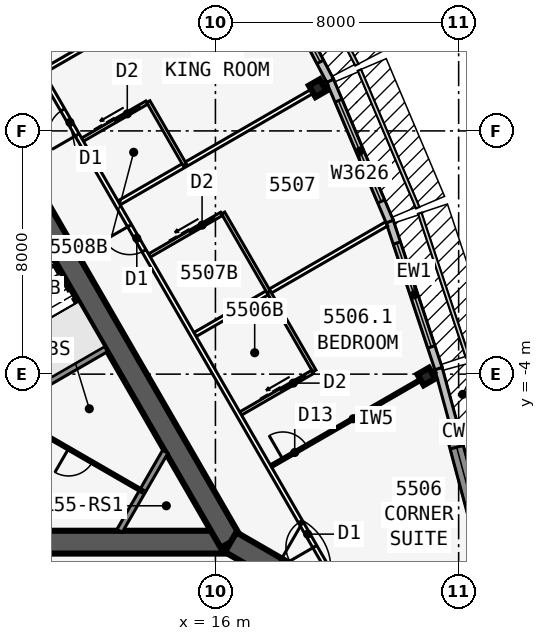
"""IFC4 building model, lengths in metres.
Left out: names, types, materials, properties, quantities, classifications, styles, units other than length and angle.
Written with IfcOpenShell. Run it as: python <this file> out.ifc"""

import sys

from ifc_helpers import new_model, si_unit, direction, frame, frame_2d, origin, origin_2d, place, context, subcontext, project, spatial, polyline, rectangle, i_section, outline, extrude, element, fill, save


model = new_model("IFC4")
c1 = context("Model", 3, precision=1e-05, world=origin(), true_north=direction((0.0, 1.0)))
c2 = subcontext(c1, "Body", "Model", "MODEL_VIEW")
j1 = project(units=[si_unit("LENGTHUNIT", "METRE"), si_unit("PLANEANGLEUNIT", "RADIAN")], contexts=[c1])
p1 = place(None, origin())
s1 = spatial("IfcSite", under=j1, at=p1, CompositionType="ELEMENT")
p2 = place(p1, origin())
s2 = spatial("IfcBuilding", under=s1, at=p2, CompositionType="ELEMENT")
p3 = place(p2, frame((0.0, 0.0, 208.1)))
s3 = spatial("IfcBuildingStorey", under=s2, at=p3, CompositionType="ELEMENT", Elevation=208.1)
p4 = place(p3, frame((-16.5, -9.526, 0.0), z_axis=(0.0, 0.0, 1.0), x_axis=(1.0, 0.0, 0.0)))
e1 = element("IfcWall", 1, at=p4, inside=s3, PredefinedType="SHEAR", context=c2, shape_type="SweptSolid", body=[
    extrude(rectangle(XDim=33.0, YDim=0.75, at=frame_2d((16.5, 0.0))), origin(), (0.0, 0.0, 1.0), 3.6),
])
p5 = place(p4, frame((14.05, 0.0, 0.0)))
e2 = element("IfcOpeningElement", 2, at=p5, cuts=e1, PredefinedType="OPENING", context=c2, shape_type="SweptSolid", body=[
    extrude(rectangle(XDim=1.8, YDim=2.13, at=frame_2d((0.9, 1.065))), frame((0.0, 0.385, 0.0), z_axis=(0.0, -1.0, 0.0), x_axis=(1.0, 0.0, 0.0)), (0.0, 0.0, 1.0), 0.77),
])
p6 = place(p3, frame((16.5, -9.526, 0.0), z_axis=(0.0, 0.0, 1.0), x_axis=(-0.499999749417, 0.866025548458, 0.0)))
e3 = element("IfcWall", 3, at=p6, inside=s3, PredefinedType="SHEAR", context=c2, shape_type="SweptSolid", body=[
    extrude(rectangle(XDim=33.0, YDim=0.75, at=frame_2d((16.5, 0.0))), origin(), (0.0, 0.0, 1.0), 3.6),
])
p7 = place(p6, frame((14.15, 0.0, 0.0)))
e4 = element("IfcOpeningElement", 4, at=p7, cuts=e3, PredefinedType="OPENING", context=c2, shape_type="SweptSolid", body=[
    extrude(rectangle(XDim=1.8, YDim=2.13, at=frame_2d((0.9, 1.065))), frame((0.0, 0.385, 0.0), z_axis=(0.0, -1.0, 0.0), x_axis=(1.0, 0.0, 0.0)), (0.0, 0.0, 1.0), 0.77),
])
p8 = place(p6, frame((12.6, 0.0, 0.0)))
e5 = element("IfcOpeningElement", 5, at=p8, cuts=e3, PredefinedType="OPENING", context=c2, shape_type="SweptSolid", body=[
    extrude(rectangle(XDim=1.0, YDim=2.13, at=frame_2d((0.5, 1.065))), frame((0.0, 0.385, 0.0), z_axis=(0.0, -1.0, 0.0), x_axis=(1.0, 0.0, 0.0)), (0.0, 0.0, 1.0), 0.77),
])
p9 = place(p3, frame((9.629, -4.775, 0.0), z_axis=(0.0, 0.0, 1.0), x_axis=(0.866008981251, 0.500028443584, 0.0)))
e6 = element("IfcWall", 6, at=p9, inside=s3, PredefinedType="SOLIDWALL", context=c2, shape_type="SweptSolid", body=[
    extrude(rectangle(XDim=3.2, YDim=0.2, at=frame_2d((1.6, 0.0))), origin(), (0.0, 0.0, 1.0), 3.435),
])
p10 = place(p3, frame((16.5, -9.526, 0.0), z_axis=(0.0, 0.0, 1.0), x_axis=(0.866031398331, -0.499989616998, 0.0)))
e7 = element("IfcWall", 7, at=p10, inside=s3, PredefinedType="SHEAR", context=c2, shape_type="SweptSolid", body=[
    extrude(rectangle(XDim=4.746, YDim=0.75, at=frame_2d((2.373, 0.0))), origin(), (0.0, 0.0, 1.0), 3.6),
])
p11 = place(p10, frame((1.725, 0.0, 0.0)))
e8 = element("IfcOpeningElement", 8, at=p11, cuts=e7, PredefinedType="OPENING", context=c2, shape_type="SweptSolid", body=[
    extrude(rectangle(XDim=1.8, YDim=2.13, at=frame_2d((0.9, 1.065))), frame((0.0, 0.385, 0.0), z_axis=(0.0, -1.0, 0.0), x_axis=(1.0, 0.0, 0.0)), (0.0, 0.0, 1.0), 0.77),
])
for number, where, z_axis, x_axis in (
    (9, (22.937, -4.078, 0.0), (0.0, 0.0, 1.0), (-0.5, 0.866, 0.0)),
    (10, (19.363, 5.406, 0.0), (0.0, 0.0, 1.0), (0.866, 0.5, 0.0)),
):
    element("IfcColumn", number, at=place(p3, frame(where, z_axis=z_axis, x_axis=x_axis)), inside=s3, PredefinedType="COLUMN", context=c2, shape_type="SweptSolid", body=[
        extrude(i_section(OverallWidth=0.411, OverallDepth=0.434, WebThickness=0.036, FlangeThickness=0.057, at=origin_2d()), origin(), (0.0, 0.0, 1.0), 3.6),
    ])
p12 = place(p3, frame((23.783, -13.798, 0.0), z_axis=(0.0, 0.0, 1.0), x_axis=(0.258799282522, 0.96593112144, 0.0)))
e11 = element("IfcWall", 11, at=p12, inside=s3, PredefinedType="SOLIDWALL", context=c2, shape_type="SweptSolid", body=[
    extrude(outline(polyline([(4.184, 0.225), (0.509, 0.225), (0.479, 0.113), (0.059, 0.225), (0.0, 0.225), (0.0, -0.225), (4.184, -0.225), (4.184, 0.225)])), origin(), (0.0, 0.0, 1.0), 3.435),
])
p13 = place(p12, frame((1.071, 0.0, 0.45)))
e12 = element("IfcOpeningElement", 12, at=p13, cuts=e11, PredefinedType="OPENING", context=c2, shape_type="SweptSolid", body=[
    extrude(rectangle(XDim=2.4, YDim=2.6, at=frame_2d((1.2, 1.3))), frame((0.0, 0.235, 0.0), z_axis=(0.0, -1.0, 0.0), x_axis=(1.0, 0.0, 0.0)), (0.0, 0.0, 1.0), 0.47),
])
p14 = place(p3, frame((24.865, -9.873, 0.0), z_axis=(0.0, 0.0, 1.0), x_axis=(-0.258784695888, 0.965935029479, 0.0)))
e13 = element("IfcWall", 13, at=p14, inside=s3, PredefinedType="SOLIDWALL", context=c2, shape_type="SweptSolid", body=[
    extrude(rectangle(XDim=4.184, YDim=0.45, at=frame_2d((2.092, 0.0))), origin(), (0.0, 0.0, 1.0), 3.435),
])
p15 = place(p14, frame((0.592, 0.0, 0.45)))
e14 = element("IfcOpeningElement", 14, at=p15, cuts=e13, PredefinedType="OPENING", context=c2, shape_type="SweptSolid", body=[
    extrude(rectangle(XDim=3.0, YDim=2.6, at=frame_2d((1.5, 1.3))), frame((0.0, 0.235, 0.0), z_axis=(0.0, -1.0, 0.0), x_axis=(1.0, 0.0, 0.0)), (0.0, 0.0, 1.0), 0.47),
])
p16 = place(p3, frame((23.879, -5.806, 0.0), z_axis=(0.0, 0.0, 1.0), x_axis=(-0.262867703986, 0.964831887015, 0.0)))
e15 = element("IfcWall", 15, at=p16, inside=s3, PredefinedType="STANDARD", context=c2, shape_type="SweptSolid", body=[
    extrude(rectangle(XDim=2.068, YDim=0.25, at=frame_2d((1.034, 0.0))), origin(), (0.0, 0.0, 1.0), 3.435),
])
p17 = place(p3, frame((23.338, -3.817, 0.0), z_axis=(0.0, 0.0, 1.0), x_axis=(-0.315108478109, 0.949055660656, 0.0)))
e16 = element("IfcWall", 16, at=p17, inside=s3, PredefinedType="STANDARD", context=c2, shape_type="SweptSolid", body=[
    extrude(rectangle(XDim=5.105, YDim=0.25, at=frame_2d((2.552, 0.0))), origin(), (0.0, 0.0, 1.0), 3.435),
])
p18 = place(p17, frame((0.752, 0.0, 0.45)))
e17 = element("IfcOpeningElement", 17, at=p18, cuts=e16, PredefinedType="OPENING", context=c2, shape_type="SweptSolid", body=[
    extrude(rectangle(XDim=3.6, YDim=2.6, at=frame_2d((1.8, 1.3))), frame((0.0, 0.135, 0.0), z_axis=(0.0, -1.0, 0.0), x_axis=(1.0, 0.0, 0.0)), (0.0, 0.0, 1.0), 0.27),
])
p19 = place(p3, frame((21.733, 1.018, 0.0), z_axis=(0.0, 0.0, 1.0), x_axis=(-0.390096809471, 0.920773848044, 0.0)))
e18 = element("IfcWall", 18, at=p19, inside=s3, PredefinedType="STANDARD", context=c2, shape_type="SweptSolid", body=[
    extrude(rectangle(XDim=5.038, YDim=0.25, at=frame_2d((2.519, 0.0))), origin(), (0.0, 0.0, 1.0), 3.435),
])
p20 = place(p19, frame((0.719, 0.0, 0.45)))
e19 = element("IfcOpeningElement", 19, at=p20, cuts=e18, PredefinedType="OPENING", context=c2, shape_type="SweptSolid", body=[
    extrude(rectangle(XDim=3.6, YDim=2.6, at=frame_2d((1.8, 1.3))), frame((0.0, 0.135, 0.0), z_axis=(0.0, -1.0, 0.0), x_axis=(1.0, 0.0, 0.0)), (0.0, 0.0, 1.0), 0.27),
])
p21 = place(p3, frame((19.772, 5.648, 0.0), z_axis=(0.0, 0.0, 1.0), x_axis=(-0.463976002579, 0.885847768542, 0.0)))
e20 = element("IfcWall", 20, at=p21, inside=s3, PredefinedType="STANDARD", context=c2, shape_type="SweptSolid", body=[
    extrude(rectangle(XDim=5.004, YDim=0.25, at=frame_2d((2.502, 0.0))), origin(), (0.0, 0.0, 1.0), 3.435),
])
p22 = place(p21, frame((0.702, 0.0, 0.45)))
e21 = element("IfcOpeningElement", 21, at=p22, cuts=e20, PredefinedType="OPENING", context=c2, shape_type="SweptSolid", body=[
    extrude(rectangle(XDim=3.6, YDim=2.6, at=frame_2d((1.8, 1.3))), frame((0.0, 0.135, 0.0), z_axis=(0.0, -1.0, 0.0), x_axis=(1.0, 0.0, 0.0)), (0.0, 0.0, 1.0), 0.27),
])
p23 = place(p3, frame((20.102, -11.115, 0.0), z_axis=(0.0, 0.0, 1.0), x_axis=(-0.500000265775, 0.866025250339, 0.0)))
e22 = element("IfcWall", 22, at=p23, inside=s3, PredefinedType="PARTITIONING", context=c2, shape_type="SweptSolid", body=[
    extrude(rectangle(XDim=39.354, YDim=0.15, at=frame_2d((19.677, 0.0))), origin(), (0.0, 0.0, 1.0), 3.435),
])
p24 = place(p23, frame((1.665, 0.0, 0.0)))
e23 = element("IfcOpeningElement", 23, at=p24, cuts=e22, PredefinedType="OPENING", context=c2, shape_type="SweptSolid", body=[
    extrude(rectangle(XDim=0.95, YDim=2.13, at=frame_2d((0.475, 1.065))), frame((0.0, 0.085, 0.0), z_axis=(0.0, -1.0, 0.0), x_axis=(1.0, 0.0, 0.0)), (0.0, 0.0, 1.0), 0.17),
])
p25 = place(p23, frame((12.902, 0.0, 0.0)))
e24 = element("IfcOpeningElement", 24, at=p25, cuts=e22, PredefinedType="OPENING", context=c2, shape_type="SweptSolid", body=[
    extrude(rectangle(XDim=0.95, YDim=2.13, at=frame_2d((0.475, 1.065))), frame((0.0, 0.085, 0.0), z_axis=(0.0, -1.0, 0.0), x_axis=(1.0, 0.0, 0.0)), (0.0, 0.0, 1.0), 0.17),
])
p26 = place(p23, frame((17.302, 0.0, 0.0)))
e25 = element("IfcOpeningElement", 25, at=p26, cuts=e22, PredefinedType="OPENING", context=c2, shape_type="SweptSolid", body=[
    extrude(rectangle(XDim=0.95, YDim=2.13, at=frame_2d((0.475, 1.065))), frame((0.0, 0.085, 0.0), z_axis=(0.0, -1.0, 0.0), x_axis=(1.0, 0.0, 0.0)), (0.0, 0.0, 1.0), 0.17),
])
p27 = place(p23, frame((22.902, 0.0, 0.0)))
e26 = element("IfcOpeningElement", 26, at=p27, cuts=e22, PredefinedType="OPENING", context=c2, shape_type="SweptSolid", body=[
    extrude(rectangle(XDim=0.95, YDim=2.13, at=frame_2d((0.475, 1.065))), frame((0.0, 0.085, 0.0), z_axis=(0.0, -1.0, 0.0), x_axis=(1.0, 0.0, 0.0)), (0.0, 0.0, 1.0), 0.17),
])
p28 = place(p23, frame((32.302, 0.0, 0.0)))
e27 = element("IfcOpeningElement", 27, at=p28, cuts=e22, PredefinedType="OPENING", context=c2, shape_type="SweptSolid", body=[
    extrude(rectangle(XDim=0.95, YDim=2.13, at=frame_2d((0.475, 1.065))), frame((0.0, 0.085, 0.0), z_axis=(0.0, -1.0, 0.0), x_axis=(1.0, 0.0, 0.0)), (0.0, 0.0, 1.0), 0.17),
])
p29 = place(p23, frame((37.302, 0.0, 0.0)))
e28 = element("IfcOpeningElement", 28, at=p29, cuts=e22, PredefinedType="OPENING", context=c2, shape_type="SweptSolid", body=[
    extrude(rectangle(XDim=0.95, YDim=2.13, at=frame_2d((0.475, 1.065))), frame((0.0, 0.085, 0.0), z_axis=(0.0, -1.0, 0.0), x_axis=(1.0, 0.0, 0.0)), (0.0, 0.0, 1.0), 0.17),
])
p30 = place(p3, frame((17.829, -7.027, 0.0), z_axis=(0.0, 0.0, 1.0), x_axis=(0.866026604282, 0.499997920671, 0.0)))
e29 = element("IfcWall", 29, at=p30, inside=s3, PredefinedType="PARTITIONING", context=c2, shape_type="SweptSolid", body=[
    extrude(rectangle(XDim=6.24, YDim=0.1, at=frame_2d((3.12, 0.0))), origin(), (0.0, 0.0, 1.0), 2.589),
])
p31 = place(p30, frame((0.45, 0.0, 0.0)))
e30 = element("IfcOpeningElement", 30, at=p31, cuts=e29, PredefinedType="OPENING", context=c2, shape_type="SweptSolid", body=[
    extrude(rectangle(XDim=0.9, YDim=2.13, at=frame_2d((0.45, 1.065))), frame((0.0, 0.06, 0.0), z_axis=(0.0, -1.0, 0.0), x_axis=(1.0, 0.0, 0.0)), (0.0, 0.0, 1.0), 0.12),
])
p32 = place(p3, frame((15.329, -2.697, 0.0), z_axis=(0.0, 0.0, 1.0), x_axis=(0.866032413668, 0.499987858329, 0.0)))
e31 = element("IfcWall", 31, at=p32, inside=s3, PredefinedType="PARTITIONING", context=c2, shape_type="SweptSolid", body=[
    extrude(rectangle(XDim=7.273, YDim=0.15, at=frame_2d((3.636, 0.0))), origin(), (0.0, 0.0, 1.0), 2.589),
])
p33 = place(p3, frame((12.829, 1.633, 0.0), z_axis=(0.0, 0.0, 1.0), x_axis=(0.866030558329, 0.49999107196, 0.0)))
e32 = element("IfcWall", 32, at=p33, inside=s3, PredefinedType="PARTITIONING", context=c2, shape_type="SweptSolid", body=[
    extrude(rectangle(XDim=7.894, YDim=0.15, at=frame_2d((3.947, 0.0))), origin(), (0.0, 0.0, 1.0), 2.589),
])
p34 = place(p3, frame((10.329, 5.963, 0.0), z_axis=(0.0, 0.0, 1.0), x_axis=(0.866016460812, 0.500015489362, 0.0)))
e33 = element("IfcWall", 33, at=p34, inside=s3, PredefinedType="PARTITIONING", context=c2, shape_type="SweptSolid", body=[
    extrude(rectangle(XDim=8.101, YDim=0.15, at=frame_2d((4.051, 0.0))), origin(), (0.0, 0.0, 1.0), 2.589),
])
p35 = place(p3, frame((19.253, -3.895, 0.0), z_axis=(0.0, 0.0, 1.0), x_axis=(-0.499990139034, 0.866031096941, 0.0)))
e34 = element("IfcWall", 34, at=p35, inside=s3, PredefinedType="PLUMBINGWALL", context=c2, shape_type="SweptSolid", body=[
    extrude(rectangle(XDim=3.0, YDim=0.12, at=frame_2d((1.5, 0.0))), origin(), (0.0, 0.0, 1.0), 3.435),
])
p36 = place(p3, frame((16.829, -5.295, 0.0), z_axis=(0.0, 0.0, 1.0), x_axis=(0.866035715982, 0.499982138324, 0.0)))
e35 = element("IfcWall", 35, at=p36, inside=s3, PredefinedType="PLUMBINGWALL", context=c2, shape_type="SweptSolid", body=[
    extrude(rectangle(XDim=2.74, YDim=0.12, at=frame_2d((1.37, 0.0))), origin(), (0.0, 0.0, 1.0), 3.435),
])
p37 = place(p36, frame((1.55, 0.0, 0.0)))
e36 = element("IfcOpeningElement", 36, at=p37, cuts=e35, PredefinedType="OPENING", context=c2, shape_type="SweptSolid", body=[
    extrude(rectangle(XDim=0.9, YDim=2.13, at=frame_2d((0.45, 1.065))), frame((0.0, 0.07, 0.0), z_axis=(0.0, -1.0, 0.0), x_axis=(1.0, 0.0, 0.0)), (0.0, 0.0, 1.0), 0.14),
])
p38 = place(p3, frame((17.753, -1.297, 0.0), z_axis=(0.0, 0.0, 1.0), x_axis=(-0.499990139034, 0.866031096941, 0.0)))
e37 = element("IfcWall", 37, at=p38, inside=s3, PredefinedType="PLUMBINGWALL", context=c2, shape_type="SweptSolid", body=[
    extrude(rectangle(XDim=3.0, YDim=0.12, at=frame_2d((1.5, 0.0))), origin(), (0.0, 0.0, 1.0), 3.435),
])
p39 = place(p3, frame((13.829, -0.099, 0.0), z_axis=(0.0, 0.0, 1.0), x_axis=(0.865997131366, 0.500048966069, 0.0)))
e38 = element("IfcWall", 38, at=p39, inside=s3, PredefinedType="PLUMBINGWALL", context=c2, shape_type="SweptSolid", body=[
    extrude(rectangle(XDim=2.74, YDim=0.12, at=frame_2d((1.37, 0.0))), origin(), (0.0, 0.0, 1.0), 3.435),
])
p40 = place(p39, frame((1.55, 0.0, 0.0)))
e39 = element("IfcOpeningElement", 39, at=p40, cuts=e38, PredefinedType="OPENING", context=c2, shape_type="SweptSolid", body=[
    extrude(rectangle(XDim=0.9, YDim=2.13, at=frame_2d((0.45, 1.065))), frame((0.0, 0.07, 0.0), z_axis=(0.0, -1.0, 0.0), x_axis=(1.0, 0.0, 0.0)), (0.0, 0.0, 1.0), 0.14),
])
p41 = place(p3, frame((14.993, 2.883, 0.0), z_axis=(0.0, 0.0, 1.0), x_axis=(-0.500001309137, 0.866024647952, 0.0)))
e40 = element("IfcWall", 40, at=p41, inside=s3, PredefinedType="PLUMBINGWALL", context=c2, shape_type="SweptSolid", body=[
    extrude(rectangle(XDim=2.4, YDim=0.12, at=frame_2d((1.2, 0.0))), origin(), (0.0, 0.0, 1.0), 3.435),
])
p42 = place(p3, frame((11.628, 3.711, 0.0), z_axis=(0.0, 0.0, 1.0), x_axis=(0.866048967903, 0.499959183527, 0.0)))
e41 = element("IfcWall", 41, at=p42, inside=s3, PredefinedType="PLUMBINGWALL", context=c2, shape_type="SweptSolid", body=[
    extrude(rectangle(XDim=2.44, YDim=0.12, at=frame_2d((1.22, 0.0))), origin(), (0.0, 0.0, 1.0), 3.435),
])
p43 = place(p42, frame((1.25, 0.0, 0.0)))
e42 = element("IfcOpeningElement", 42, at=p43, cuts=e41, PredefinedType="OPENING", context=c2, shape_type="SweptSolid", body=[
    extrude(rectangle(XDim=0.9, YDim=2.13, at=frame_2d((0.45, 1.065))), frame((0.0, 0.07, 0.0), z_axis=(0.0, -1.0, 0.0), x_axis=(1.0, 0.0, 0.0)), (0.0, 0.0, 1.0), 0.14),
])
p44 = place(p3, frame((14.349, -6.551, 0.0), z_axis=(0.0, 0.0, 1.0), x_axis=(-0.499952404951, -0.866052881055, 0.0)))
e43 = element("IfcWall", 43, at=p44, inside=s3, PredefinedType="SOLIDWALL", context=c2, shape_type="SweptSolid", body=[
    extrude(rectangle(XDim=3.002, YDim=0.2, at=frame_2d((1.501, 0.0))), origin(), (0.0, 0.0, 1.0), 3.435),
])
p45 = place(p3, frame((13.599, -7.851, 0.0), z_axis=(0.0, 0.0, 1.0), x_axis=(-0.866026081073, 0.499998826899, 0.0)))
e44 = element("IfcWall", 44, at=p45, inside=s3, PredefinedType="PARTITIONING", context=c2, shape_type="SweptSolid", body=[
    extrude(rectangle(XDim=3.925, YDim=0.1, at=frame_2d((1.963, 0.0))), origin(), (0.0, 0.0, 1.0), 3.435),
])
p46 = place(p45, frame((1.905, 0.0, 0.0)))
e45 = element("IfcOpeningElement", 45, at=p46, cuts=e44, PredefinedType="OPENING", context=c2, shape_type="SweptSolid", body=[
    extrude(rectangle(XDim=0.9, YDim=2.13, at=frame_2d((0.45, 1.065))), frame((0.0, 0.06, 0.0), z_axis=(0.0, -1.0, 0.0), x_axis=(1.0, 0.0, 0.0)), (0.0, 0.0, 1.0), 0.12),
])
p47 = place(p15, origin())
e46 = element("IfcWindow", 46, at=p47, inside=s3, PartitioningType="SINGLE_PANEL", PredefinedType="WINDOW", context=c2, shape_type="SweptSolid", body=[
    extrude(rectangle(XDim=3.0, YDim=2.6, at=frame_2d((1.5, 1.3))), frame((0.0, 0.03, 0.0), z_axis=(0.0, -1.0, 0.0), x_axis=(1.0, 0.0, 0.0)), (0.0, 0.0, 1.0), 0.06),
])
fill(e14, e46)
p48 = place(p18, origin())
e47 = element("IfcWindow", 47, at=p48, inside=s3, PartitioningType="SINGLE_PANEL", PredefinedType="WINDOW", context=c2, shape_type="SweptSolid", body=[
    extrude(rectangle(XDim=3.6, YDim=2.6, at=frame_2d((1.8, 1.3))), frame((0.0, 0.03, 0.0), z_axis=(0.0, -1.0, 0.0), x_axis=(1.0, 0.0, 0.0)), (0.0, 0.0, 1.0), 0.06),
])
fill(e17, e47)
p49 = place(p20, origin())
e48 = element("IfcWindow", 48, at=p49, inside=s3, PartitioningType="SINGLE_PANEL", PredefinedType="WINDOW", context=c2, shape_type="SweptSolid", body=[
    extrude(rectangle(XDim=3.6, YDim=2.6, at=frame_2d((1.8, 1.3))), frame((0.0, 0.03, 0.0), z_axis=(0.0, -1.0, 0.0), x_axis=(1.0, 0.0, 0.0)), (0.0, 0.0, 1.0), 0.06),
])
fill(e19, e48)
p50 = place(p22, origin())
e49 = element("IfcWindow", 49, at=p50, inside=s3, PartitioningType="SINGLE_PANEL", PredefinedType="WINDOW", context=c2, shape_type="SweptSolid", body=[
    extrude(rectangle(XDim=3.6, YDim=2.6, at=frame_2d((1.8, 1.3))), frame((0.0, 0.03, 0.0), z_axis=(0.0, -1.0, 0.0), x_axis=(1.0, 0.0, 0.0)), (0.0, 0.0, 1.0), 0.06),
])
fill(e21, e49)
p51 = place(p31, origin())
e50 = element("IfcDoor", 50, at=p51, inside=s3, OperationType="SINGLE_SWING_LEFT", PredefinedType="DOOR", context=c2, shape_type="SweptSolid", body=[
    extrude(rectangle(XDim=0.9, YDim=2.13, at=frame_2d((0.45, 1.065))), frame((0.0, 0.025, 0.0), z_axis=(0.0, -1.0, 0.0), x_axis=(1.0, 0.0, 0.0)), (0.0, 0.0, 1.0), 0.05),
])
fill(e30, e50)
p52 = place(p24, origin())
e51 = element("IfcDoor", 51, at=p52, inside=s3, OperationType="SINGLE_SWING_LEFT", PredefinedType="DOOR", context=c2, shape_type="SweptSolid", body=[
    extrude(rectangle(XDim=0.95, YDim=2.13, at=frame_2d((0.475, 1.065))), frame((0.0, 0.025, 0.0), z_axis=(0.0, -1.0, 0.0), x_axis=(1.0, 0.0, 0.0)), (0.0, 0.0, 1.0), 0.05),
])
fill(e23, e51)
p53 = place(p37, origin())
e52 = element("IfcDoor", 52, at=p53, inside=s3, OperationType="SLIDING_TO_LEFT", PredefinedType="DOOR", context=c2, shape_type="SweptSolid", body=[
    extrude(rectangle(XDim=0.9, YDim=2.13, at=frame_2d((0.45, 1.065))), frame((0.0, 0.025, 0.0), z_axis=(0.0, -1.0, 0.0), x_axis=(1.0, 0.0, 0.0)), (0.0, 0.0, 1.0), 0.05),
])
fill(e36, e52)
p54 = place(p40, origin())
e53 = element("IfcDoor", 53, at=p54, inside=s3, OperationType="SLIDING_TO_LEFT", PredefinedType="DOOR", context=c2, shape_type="SweptSolid", body=[
    extrude(rectangle(XDim=0.9, YDim=2.13, at=frame_2d((0.45, 1.065))), frame((0.0, 0.025, 0.0), z_axis=(0.0, -1.0, 0.0), x_axis=(1.0, 0.0, 0.0)), (0.0, 0.0, 1.0), 0.05),
])
fill(e39, e53)
p55 = place(p25, origin())
e54 = element("IfcDoor", 54, at=p55, inside=s3, OperationType="SINGLE_SWING_RIGHT", PredefinedType="DOOR", context=c2, shape_type="SweptSolid", body=[
    extrude(rectangle(XDim=0.95, YDim=2.13, at=frame_2d((0.475, 1.065))), frame((0.0, 0.025, 0.0), z_axis=(0.0, -1.0, 0.0), x_axis=(1.0, 0.0, 0.0)), (0.0, 0.0, 1.0), 0.05),
])
fill(e24, e54)
p56 = place(p43, origin())
e55 = element("IfcDoor", 55, at=p56, inside=s3, OperationType="SLIDING_TO_LEFT", PredefinedType="DOOR", context=c2, shape_type="SweptSolid", body=[
    extrude(rectangle(XDim=0.9, YDim=2.13, at=frame_2d((0.45, 1.065))), frame((0.0, 0.025, 0.0), z_axis=(0.0, -1.0, 0.0), x_axis=(1.0, 0.0, 0.0)), (0.0, 0.0, 1.0), 0.05),
])
fill(e42, e55)
p57 = place(p26, origin())
e56 = element("IfcDoor", 56, at=p57, inside=s3, OperationType="SINGLE_SWING_LEFT", PredefinedType="DOOR", context=c2, shape_type="SweptSolid", body=[
    extrude(rectangle(XDim=0.95, YDim=2.13, at=frame_2d((0.475, 1.065))), frame((0.0, 0.025, 0.0), z_axis=(0.0, -1.0, 0.0), x_axis=(1.0, 0.0, 0.0)), (0.0, 0.0, 1.0), 0.05),
])
fill(e25, e56)
p58 = place(p46, origin())
e57 = element("IfcDoor", 57, at=p58, inside=s3, OperationType="SINGLE_SWING_RIGHT", PredefinedType="DOOR", context=c2, shape_type="SweptSolid", body=[
    extrude(rectangle(XDim=0.9, YDim=2.13, at=frame_2d((0.45, 1.065))), frame((0.0, 0.025, 0.0), z_axis=(0.0, -1.0, 0.0), x_axis=(1.0, 0.0, 0.0)), (0.0, 0.0, 1.0), 0.05),
])
fill(e45, e57)
save(model, sys.argv[1])
